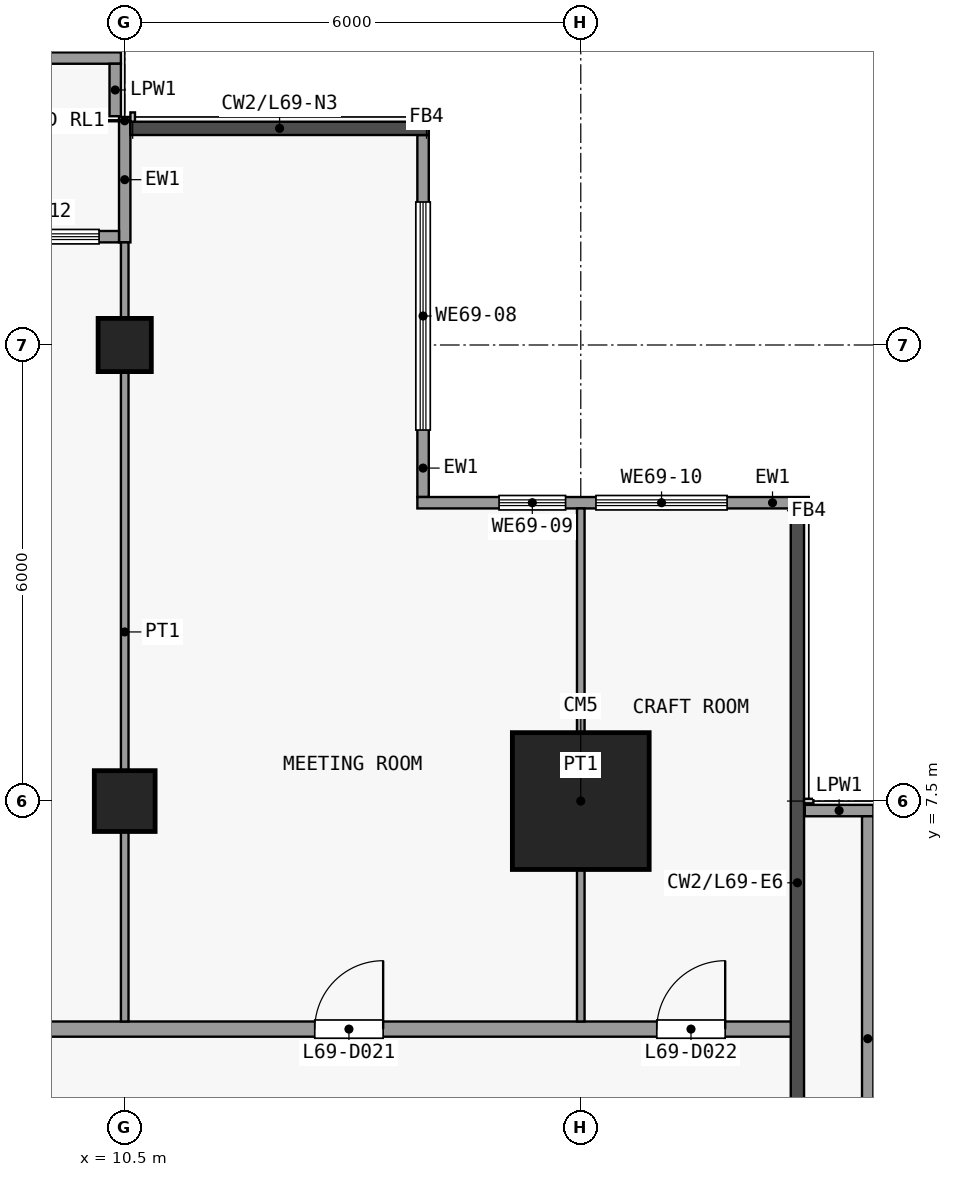
"""IFC4 building model, lengths in metres.
Left out: names, types, materials, properties, quantities, classifications, styles, units other than length and angle.
Written with IfcOpenShell. Run it as: python <this file> out.ifc"""

import sys

from ifc_helpers import new_model, si_unit, direction, frame, frame_2d, origin, origin_2d, place, context, subcontext, project, spatial, rectangle, extrude, element, fill, save


model = new_model("IFC4")
c1 = context("Model", 3, precision=1e-05, world=origin(), true_north=direction((0.0, 1.0)))
c2 = subcontext(c1, "Body", "Model", "MODEL_VIEW")
j1 = project(units=[si_unit("LENGTHUNIT", "METRE"), si_unit("PLANEANGLEUNIT", "RADIAN")], contexts=[c1])
p1 = place(None, origin())
s1 = spatial("IfcSite", under=j1, at=p1, CompositionType="ELEMENT")
p2 = place(p1, origin())
s2 = spatial("IfcBuilding", under=s1, at=p2, CompositionType="ELEMENT")
p3 = place(p2, frame((0.0, 0.0, 273.5)))
s3 = spatial("IfcBuildingStorey", under=s2, at=p3, CompositionType="ELEMENT", Elevation=273.5)
p4 = place(p3, frame((10.5, 7.5, 0.0), z_axis=(0.0, 0.0, 1.0), x_axis=(1.0, 0.0, 0.0)))
e1 = element("IfcColumn", 1, at=p4, inside=s3, PredefinedType="COLUMN", context=c2, shape_type="SweptSolid", body=[
    extrude(rectangle(XDim=0.8, YDim=0.8, at=origin_2d()), origin(), (0.0, 0.0, 1.0), 3.6),
])
p5 = place(p3, frame((10.5, 13.5, 0.0), z_axis=(0.0, 0.0, 1.0), x_axis=(1.0, 0.0, 0.0)))
e2 = element("IfcColumn", 2, at=p5, inside=s3, PredefinedType="COLUMN", context=c2, shape_type="SweptSolid", body=[
    extrude(rectangle(XDim=0.7, YDim=0.7, at=origin_2d()), origin(), (0.0, 0.0, 1.0), 3.6),
])
p6 = place(p3, frame((16.5, 7.5, 0.0), z_axis=(0.0, 0.0, 1.0), x_axis=(1.0, 0.0, 0.0)))
e3 = element("IfcColumn", 3, at=p6, inside=s3, PredefinedType="COLUMN", context=c2, shape_type="SweptSolid", body=[
    extrude(rectangle(XDim=1.8, YDim=1.8, at=origin_2d()), origin(), (0.0, 0.0, 1.0), 3.6),
])
p7 = place(p3, frame((14.425, 16.262, 0.0), z_axis=(0.0, 0.0, 1.0), x_axis=(0.0, -1.0, 0.0)))
e4 = element("IfcWall", 4, at=p7, inside=s3, PredefinedType="SOLIDWALL", context=c2, shape_type="SweptSolid", body=[
    extrude(rectangle(XDim=4.762, YDim=0.15, at=frame_2d((2.381, 0.0))), origin(), (0.0, 0.0, 1.0), 3.3),
])
p8 = place(p7, frame((0.881, 0.0, 0.9)))
e5 = element("IfcOpeningElement", 5, at=p8, cuts=e4, PredefinedType="OPENING", context=c2, shape_type="SweptSolid", body=[
    extrude(rectangle(XDim=3.0, YDim=2.4, at=frame_2d((1.5, 1.2))), frame((0.0, 0.085, 0.0), z_axis=(0.0, -1.0, 0.0), x_axis=(1.0, 0.0, 0.0)), (0.0, 0.0, 1.0), 0.17),
])
p9 = place(p3, frame((14.35, 11.425, 0.0), z_axis=(0.0, 0.0, 1.0), x_axis=(1.0, 0.0, 0.0)))
e6 = element("IfcWall", 6, at=p9, inside=s3, PredefinedType="SOLIDWALL", context=c2, shape_type="SweptSolid", body=[
    extrude(rectangle(XDim=5.15, YDim=0.15, at=frame_2d((2.575, 0.0))), origin(), (0.0, 0.0, 1.0), 3.3),
])
p10 = place(p9, frame((1.075, 0.0, 0.9)))
e7 = element("IfcOpeningElement", 7, at=p10, cuts=e6, PredefinedType="OPENING", context=c2, shape_type="SweptSolid", body=[
    extrude(rectangle(XDim=0.875, YDim=2.4, at=frame_2d((0.438, 1.2))), frame((0.0, 0.085, 0.0), z_axis=(0.0, -1.0, 0.0), x_axis=(1.0, 0.0, 0.0)), (0.0, 0.0, 1.0), 0.17),
])
p11 = place(p9, frame((2.35, 0.0, 0.9)))
e8 = element("IfcOpeningElement", 8, at=p11, cuts=e6, PredefinedType="OPENING", context=c2, shape_type="SweptSolid", body=[
    extrude(rectangle(XDim=1.725, YDim=2.4, at=frame_2d((0.863, 1.2))), frame((0.0, 0.085, 0.0), z_axis=(0.0, -1.0, 0.0), x_axis=(1.0, 0.0, 0.0)), (0.0, 0.0, 1.0), 0.17),
])
p12 = place(p3, frame((10.5, 14.85, 0.0), z_axis=(0.0, 0.0, 1.0), x_axis=(0.0, 1.0, 0.0)))
e9 = element("IfcWall", 9, at=p12, inside=s3, PredefinedType="SOLIDWALL", context=c2, shape_type="SweptSolid", body=[
    extrude(rectangle(XDim=1.65, YDim=0.15, at=frame_2d((0.825, 0.0))), origin(), (0.0, 0.0, 1.0), 3.3),
])
p13 = place(p3, frame((4.575, 14.925, 0.0), z_axis=(0.0, 0.0, 1.0), x_axis=(1.0, 0.0, 0.0)))
e10 = element("IfcWall", 10, at=p13, inside=s3, PredefinedType="SOLIDWALL", context=c2, shape_type="SweptSolid", body=[
    extrude(rectangle(XDim=5.85, YDim=0.15, at=frame_2d((2.925, 0.0))), origin(), (0.0, 0.0, 1.0), 3.3),
])
p14 = place(p13, frame((2.325, 0.0, 0.0)))
e11 = element("IfcOpeningElement", 11, at=p14, cuts=e10, PredefinedType="OPENING", context=c2, shape_type="SweptSolid", body=[
    extrude(rectangle(XDim=1.2, YDim=2.4, at=frame_2d((0.6, 1.2))), frame((0.0, 0.085, 0.0), z_axis=(0.0, -1.0, 0.0), x_axis=(1.0, 0.0, 0.0)), (0.0, 0.0, 1.0), 0.17),
])
p15 = place(p13, frame((0.262, 0.0, 0.9)))
e12 = element("IfcOpeningElement", 12, at=p15, cuts=e10, PredefinedType="OPENING", context=c2, shape_type="SweptSolid", body=[
    extrude(rectangle(XDim=1.8, YDim=2.1, at=frame_2d((0.9, 1.05))), frame((0.0, 0.085, 0.0), z_axis=(0.0, -1.0, 0.0), x_axis=(1.0, 0.0, 0.0)), (0.0, 0.0, 1.0), 0.17),
])
p16 = place(p13, frame((3.788, 0.0, 0.9)))
e13 = element("IfcOpeningElement", 13, at=p16, cuts=e10, PredefinedType="OPENING", context=c2, shape_type="SweptSolid", body=[
    extrude(rectangle(XDim=1.8, YDim=2.1, at=frame_2d((0.9, 1.05))), frame((0.0, 0.085, 0.0), z_axis=(0.0, -1.0, 0.0), x_axis=(1.0, 0.0, 0.0)), (0.0, 0.0, 1.0), 0.17),
])
p17 = place(p3, frame((4.51, 17.275, 0.0), z_axis=(0.0, 0.0, 1.0), x_axis=(1.0, 0.0, 0.0)))
e14 = element("IfcWall", 14, at=p17, inside=s3, PredefinedType="PARAPET", context=c2, shape_type="SweptSolid", body=[
    extrude(rectangle(XDim=5.94, YDim=0.15, at=frame_2d((2.97, 0.0))), origin(), (0.0, 0.0, 1.0), 1.15),
])
p18 = place(p3, frame((10.375, 17.2, 0.0), z_axis=(0.0, 0.0, 1.0), x_axis=(0.0, -1.0, 0.0)))
e15 = element("IfcWall", 15, at=p18, inside=s3, PredefinedType="PARAPET", context=c2, shape_type="SweptSolid", body=[
    extrude(rectangle(XDim=0.69, YDim=0.15, at=frame_2d((0.345, 0.0))), origin(), (0.0, 0.0, 1.0), 1.15),
])
p19 = place(p3, frame((19.448, 7.375, 0.0), z_axis=(0.0, 0.0, 1.0), x_axis=(1.0, 0.0, 0.0)))
e16 = element("IfcWall", 16, at=p19, inside=s3, PredefinedType="PARAPET", context=c2, shape_type="SweptSolid", body=[
    extrude(rectangle(XDim=0.903, YDim=0.15, at=frame_2d((0.451, 0.0))), origin(), (0.0, 0.0, 1.0), 1.15),
])
p20 = place(p3, frame((20.275, 7.3, 0.0), z_axis=(0.0, 0.0, 1.0), x_axis=(0.0, -1.0, 0.0)))
e17 = element("IfcWall", 17, at=p20, inside=s3, PredefinedType="PARAPET", context=c2, shape_type="SweptSolid", body=[
    extrude(rectangle(XDim=5.853, YDim=0.15, at=frame_2d((2.926, 0.0))), origin(), (0.0, 0.0, 1.0), 1.15),
])
p21 = place(p3, frame((-19.35, 4.5, 0.0), z_axis=(0.0, 0.0, 1.0), x_axis=(1.0, 0.0, 0.0)))
e18 = element("IfcWall", 18, at=p21, inside=s3, PredefinedType="PARTITIONING", context=c2, shape_type="SweptSolid", body=[
    extrude(rectangle(XDim=38.7, YDim=0.2, at=frame_2d((19.35, 0.0))), origin(), (0.0, 0.0, 1.0), 3.3),
])
p22 = place(p21, frame((1.0, 0.0, 0.0)))
e19 = element("IfcOpeningElement", 19, at=p22, cuts=e18, PredefinedType="OPENING", context=c2, shape_type="SweptSolid", body=[
    extrude(rectangle(XDim=0.9, YDim=2.1, at=frame_2d((0.45, 1.05))), frame((0.0, 0.11, 0.0), z_axis=(0.0, -1.0, 0.0), x_axis=(1.0, 0.0, 0.0)), (0.0, 0.0, 1.0), 0.22),
])
p23 = place(p21, frame((5.35, 0.0, 0.0)))
e20 = element("IfcOpeningElement", 20, at=p23, cuts=e18, PredefinedType="OPENING", context=c2, shape_type="SweptSolid", body=[
    extrude(rectangle(XDim=0.9, YDim=2.1, at=frame_2d((0.45, 1.05))), frame((0.0, 0.11, 0.0), z_axis=(0.0, -1.0, 0.0), x_axis=(1.0, 0.0, 0.0)), (0.0, 0.0, 1.0), 0.22),
])
p24 = place(p21, frame((11.35, 0.0, 0.0)))
e21 = element("IfcOpeningElement", 21, at=p24, cuts=e18, PredefinedType="OPENING", context=c2, shape_type="SweptSolid", body=[
    extrude(rectangle(XDim=0.9, YDim=2.1, at=frame_2d((0.45, 1.05))), frame((0.0, 0.11, 0.0), z_axis=(0.0, -1.0, 0.0), x_axis=(1.0, 0.0, 0.0)), (0.0, 0.0, 1.0), 0.22),
])
p25 = place(p21, frame((18.85, 0.0, 0.0)))
e22 = element("IfcOpeningElement", 22, at=p25, cuts=e18, PredefinedType="OPENING", context=c2, shape_type="SweptSolid", body=[
    extrude(rectangle(XDim=0.9, YDim=2.1, at=frame_2d((0.45, 1.05))), frame((0.0, 0.11, 0.0), z_axis=(0.0, -1.0, 0.0), x_axis=(1.0, 0.0, 0.0)), (0.0, 0.0, 1.0), 0.22),
])
p26 = place(p21, frame((26.35, 0.0, 0.0)))
e23 = element("IfcOpeningElement", 23, at=p26, cuts=e18, PredefinedType="OPENING", context=c2, shape_type="SweptSolid", body=[
    extrude(rectangle(XDim=0.9, YDim=2.1, at=frame_2d((0.45, 1.05))), frame((0.0, 0.11, 0.0), z_axis=(0.0, -1.0, 0.0), x_axis=(1.0, 0.0, 0.0)), (0.0, 0.0, 1.0), 0.22),
])
p27 = place(p21, frame((32.35, 0.0, 0.0)))
e24 = element("IfcOpeningElement", 24, at=p27, cuts=e18, PredefinedType="OPENING", context=c2, shape_type="SweptSolid", body=[
    extrude(rectangle(XDim=0.9, YDim=2.1, at=frame_2d((0.45, 1.05))), frame((0.0, 0.11, 0.0), z_axis=(0.0, -1.0, 0.0), x_axis=(1.0, 0.0, 0.0)), (0.0, 0.0, 1.0), 0.22),
])
p28 = place(p21, frame((36.85, 0.0, 0.0)))
e25 = element("IfcOpeningElement", 25, at=p28, cuts=e18, PredefinedType="OPENING", context=c2, shape_type="SweptSolid", body=[
    extrude(rectangle(XDim=0.9, YDim=2.1, at=frame_2d((0.45, 1.05))), frame((0.0, 0.11, 0.0), z_axis=(0.0, -1.0, 0.0), x_axis=(1.0, 0.0, 0.0)), (0.0, 0.0, 1.0), 0.22),
])
p29 = place(p3, frame((10.5, 4.6, 0.0), z_axis=(0.0, 0.0, 1.0), x_axis=(0.0, 1.0, 0.0)))
e26 = element("IfcWall", 26, at=p29, inside=s3, PredefinedType="PARTITIONING", context=c2, shape_type="SweptSolid", body=[
    extrude(rectangle(XDim=10.25, YDim=0.1, at=frame_2d((5.125, 0.0))), origin(), (0.0, 0.0, 1.0), 3.3),
])
p30 = place(p3, frame((16.5, 4.6, 0.0), z_axis=(0.0, 0.0, 1.0), x_axis=(0.0, 1.0, 0.0)))
e27 = element("IfcWall", 27, at=p30, inside=s3, PredefinedType="PARTITIONING", context=c2, shape_type="SweptSolid", body=[
    extrude(rectangle(XDim=6.75, YDim=0.1, at=frame_2d((3.375, 0.0))), origin(), (0.0, 0.0, 1.0), 3.3),
])
p31 = place(p8, origin())
e28 = element("IfcWindow", 28, at=p31, inside=s3, PartitioningType="SINGLE_PANEL", PredefinedType="WINDOW", context=c2, shape_type="SweptSolid", body=[
    extrude(rectangle(XDim=3.0, YDim=2.4, at=frame_2d((1.5, 1.2))), frame((0.0, 0.03, 0.0), z_axis=(0.0, -1.0, 0.0), x_axis=(1.0, 0.0, 0.0)), (0.0, 0.0, 1.0), 0.06),
])
fill(e5, e28)
p32 = place(p10, origin())
e29 = element("IfcWindow", 29, at=p32, inside=s3, PartitioningType="SINGLE_PANEL", PredefinedType="WINDOW", context=c2, shape_type="SweptSolid", body=[
    extrude(rectangle(XDim=0.875, YDim=2.4, at=frame_2d((0.438, 1.2))), frame((0.0, 0.03, 0.0), z_axis=(0.0, -1.0, 0.0), x_axis=(1.0, 0.0, 0.0)), (0.0, 0.0, 1.0), 0.06),
])
fill(e7, e29)
p33 = place(p11, origin())
e30 = element("IfcWindow", 30, at=p33, inside=s3, PartitioningType="SINGLE_PANEL", PredefinedType="WINDOW", context=c2, shape_type="SweptSolid", body=[
    extrude(rectangle(XDim=1.725, YDim=2.4, at=frame_2d((0.863, 1.2))), frame((0.0, 0.03, 0.0), z_axis=(0.0, -1.0, 0.0), x_axis=(1.0, 0.0, 0.0)), (0.0, 0.0, 1.0), 0.06),
])
fill(e8, e30)
p34 = place(p16, origin())
e31 = element("IfcWindow", 31, at=p34, inside=s3, PartitioningType="SINGLE_PANEL", PredefinedType="WINDOW", context=c2, shape_type="SweptSolid", body=[
    extrude(rectangle(XDim=1.8, YDim=2.1, at=frame_2d((0.9, 1.05))), frame((0.0, 0.03, 0.0), z_axis=(0.0, -1.0, 0.0), x_axis=(1.0, 0.0, 0.0)), (0.0, 0.0, 1.0), 0.06),
])
fill(e13, e31)
p35 = place(p27, origin())
e32 = element("IfcDoor", 32, at=p35, inside=s3, OperationType="SINGLE_SWING_LEFT", PredefinedType="DOOR", context=c2, shape_type="SweptSolid", body=[
    extrude(rectangle(XDim=0.9, YDim=2.1, at=frame_2d((0.45, 1.05))), frame((0.0, 0.025, 0.0), z_axis=(0.0, -1.0, 0.0), x_axis=(1.0, 0.0, 0.0)), (0.0, 0.0, 1.0), 0.05),
])
fill(e24, e32)
p36 = place(p28, origin())
e33 = element("IfcDoor", 33, at=p36, inside=s3, OperationType="SINGLE_SWING_LEFT", PredefinedType="DOOR", context=c2, shape_type="SweptSolid", body=[
    extrude(rectangle(XDim=0.9, YDim=2.1, at=frame_2d((0.45, 1.05))), frame((0.0, 0.025, 0.0), z_axis=(0.0, -1.0, 0.0), x_axis=(1.0, 0.0, 0.0)), (0.0, 0.0, 1.0), 0.05),
])
fill(e25, e33)
save(model, sys.argv[1])
